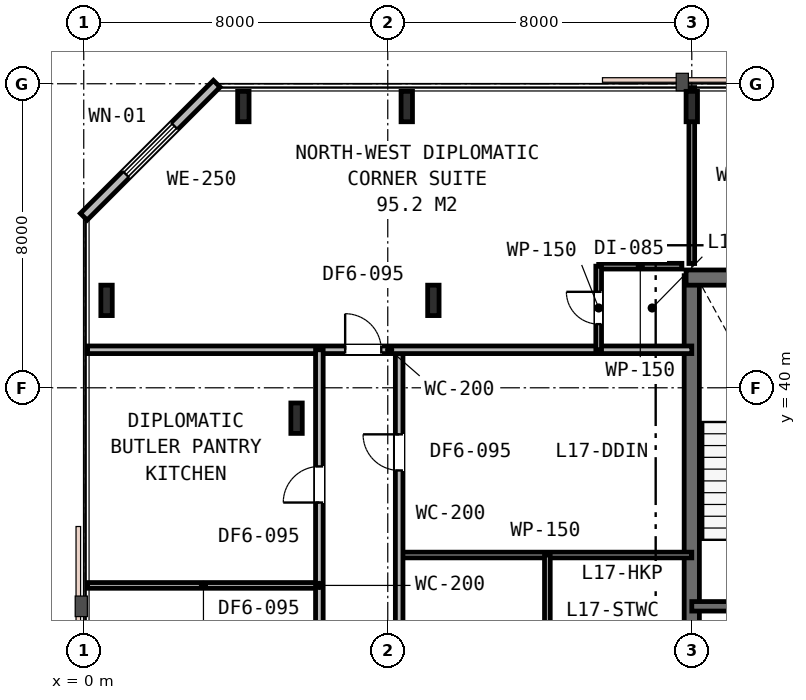
"""IFC4 building model, lengths in metres.
Left out: names, types, materials, properties, quantities, classifications, styles, units other than length and angle.
Written with IfcOpenShell. Run it as: python <this file> out.ifc"""

import sys

from ifc_helpers import new_model, si_unit, direction, frame, frame_2d, origin, origin_2d, place, context, subcontext, project, spatial, rectangle, i_section, extrude, element, fill, save


model = new_model("IFC4")
c1 = context("Model", 3, precision=1e-05, world=origin(), true_north=direction((0.0, 1.0)))
c2 = subcontext(c1, "Body", "Model", "MODEL_VIEW")
j1 = project(units=[si_unit("LENGTHUNIT", "METRE"), si_unit("PLANEANGLEUNIT", "RADIAN")], contexts=[c1])
p1 = place(None, origin())
s1 = spatial("IfcSite", under=j1, at=p1, CompositionType="ELEMENT")
p2 = place(p1, origin())
s2 = spatial("IfcBuilding", under=s1, at=p2, CompositionType="ELEMENT")
p3 = place(p2, frame((0.0, 0.0, 69.0)))
s3 = spatial("IfcBuildingStorey", under=s2, at=p3, CompositionType="ELEMENT", Elevation=69.0)
p4 = place(p3, frame((16.0, 30.65, 0.0), z_axis=(0.0, 0.0, 1.0), x_axis=(0.0, 1.0, 0.0)))
e1 = element("IfcWall", 1, at=p4, inside=s3, PredefinedType="SHEAR", context=c2, shape_type="SweptSolid", body=[
    extrude(rectangle(XDim=12.3, YDim=0.4, at=frame_2d((6.15, 0.0))), origin(), (0.0, 0.0, 1.0), 3.6),
])
p5 = place(p3, frame((15.85, 42.9, 0.0), z_axis=(0.0, 0.0, 1.0), x_axis=(1.0, 0.0, 0.0)))
e2 = element("IfcWall", 2, at=p5, inside=s3, PredefinedType="SHEAR", context=c2, shape_type="SweptSolid", body=[
    extrude(rectangle(XDim=24.3, YDim=0.4, at=frame_2d((12.15, 0.0))), origin(), (0.0, 0.0, 1.0), 3.6),
])
p6 = place(p3, frame((16.0, 34.25, 0.0), z_axis=(0.0, 0.0, 1.0), x_axis=(1.0, 0.0, 0.0)))
e3 = element("IfcWall", 3, at=p6, inside=s3, PredefinedType="SHEAR", context=c2, shape_type="SweptSolid", body=[
    extrude(rectangle(XDim=6.05, YDim=0.25, at=frame_2d((3.025, 0.0))), origin(), (0.0, 0.0, 1.0), 3.6),
])
p7 = place(p6, frame((1.25, 0.0, 0.0)))
e4 = element("IfcOpeningElement", 4, at=p7, cuts=e3, PredefinedType="OPENING", context=c2, shape_type="SweptSolid", body=[
    extrude(rectangle(XDim=1.0, YDim=2.15, at=frame_2d((0.5, 1.075))), frame((0.0, 0.135, 0.0), z_axis=(0.0, -1.0, 0.0), x_axis=(1.0, 0.0, 0.0)), (0.0, 0.0, 1.0), 0.27),
])
p8 = place(p6, frame((4.2, 0.0, 0.0)))
e5 = element("IfcOpeningElement", 5, at=p8, cuts=e3, PredefinedType="OPENING", context=c2, shape_type="SweptSolid", body=[
    extrude(rectangle(XDim=1.1, YDim=2.15, at=frame_2d((0.55, 1.075))), frame((0.0, 0.135, 0.0), z_axis=(0.0, -1.0, 0.0), x_axis=(1.0, 0.0, 0.0)), (0.0, 0.0, 1.0), 0.27),
])
for number, where, z_axis, x_axis in (
    (6, (5.6, 39.2, 0.0), (0.0, 0.0, 1.0), (1.0, 0.0, 0.0)),
    (7, (9.2, 42.3, 0.0), (0.0, 0.0, 1.0), (1.0, 0.0, 0.0)),
    (8, (0.6, 42.3, 0.0), (0.0, 0.0, 1.0), (1.0, 0.0, 0.0)),
    (9, (4.2, 47.4, 0.0), (0.0, 0.0, 1.0), (1.0, 0.0, 0.0)),
    (10, (8.5, 47.4, 0.0), (0.0, 0.0, 1.0), (1.0, 0.0, 0.0)),
    (11, (16.0, 47.4, 0.0), (0.0, 0.0, 1.0), (1.0, 0.0, 0.0)),
):
    element("IfcColumn", number, at=place(p3, frame(where, z_axis=z_axis, x_axis=x_axis)), inside=s3, PredefinedType="COLUMN", context=c2, shape_type="SweptSolid", body=[
        extrude(i_section(OverallWidth=0.3, OverallDepth=0.8, WebThickness=0.018, FlangeThickness=0.033, FilletRadius=0.03, at=origin_2d()), origin(), (0.0, 0.0, 1.0), 3.6),
    ])
p9 = place(p3, frame((3.5, 48.0, 0.0), z_axis=(0.0, 0.0, 1.0), x_axis=(-0.707106781187, -0.707106781187, 0.0)))
e12 = element("IfcWall", 12, at=p9, inside=s3, PredefinedType="STANDARD", context=c2, shape_type="SweptSolid", body=[
    extrude(rectangle(XDim=4.95, YDim=0.25, at=frame_2d((2.475, 0.0))), origin(), (0.0, 0.0, 1.0), 3.33),
])
p10 = place(p9, frame((1.575, 0.0, 0.75)))
e13 = element("IfcOpeningElement", 13, at=p10, cuts=e12, PredefinedType="OPENING", context=c2, shape_type="SweptSolid", body=[
    extrude(rectangle(XDim=1.8, YDim=1.85, at=frame_2d((0.9, 0.925))), frame((0.0, 0.135, 0.0), z_axis=(0.0, -1.0, 0.0), x_axis=(1.0, 0.0, 0.0)), (0.0, 0.0, 1.0), 0.27),
])
p11 = place(p3, frame((8.3, 35.6, 0.0), z_axis=(0.0, 0.0, 1.0), x_axis=(1.0, 0.0, 0.0)))
e14 = element("IfcWall", 14, at=p11, inside=s3, PredefinedType="PARTITIONING", context=c2, shape_type="SweptSolid", body=[
    extrude(rectangle(XDim=7.7, YDim=0.15, at=frame_2d((3.85, 0.0))), origin(), (0.0, 0.0, 1.0), 2.83),
])
p12 = place(p3, frame((12.2, 30.8, 0.0), z_axis=(0.0, 0.0, 1.0), x_axis=(0.0, 1.0, 0.0)))
e15 = element("IfcWall", 15, at=p12, inside=s3, PredefinedType="PARTITIONING", context=c2, shape_type="SweptSolid", body=[
    extrude(rectangle(XDim=4.8, YDim=0.15, at=frame_2d((2.4, 0.0))), origin(), (0.0, 0.0, 1.0), 2.83),
])
p13 = place(p3, frame((8.3, 30.8, 0.0), z_axis=(0.0, 0.0, 1.0), x_axis=(0.0, 1.0, 0.0)))
e16 = element("IfcWall", 16, at=p13, inside=s3, PredefinedType="PARTITIONING", context=c2, shape_type="SweptSolid", body=[
    extrude(rectangle(XDim=10.2, YDim=0.2, at=frame_2d((5.1, 0.0))), origin(), (0.0, 0.0, 1.0), 2.83),
])
p14 = place(p13, frame((1.95, 0.0, 0.0)))
e17 = element("IfcOpeningElement", 17, at=p14, cuts=e16, PredefinedType="OPENING", context=c2, shape_type="SweptSolid", body=[
    extrude(rectangle(XDim=0.9, YDim=2.15, at=frame_2d((0.45, 1.075))), frame((0.0, 0.11, 0.0), z_axis=(0.0, -1.0, 0.0), x_axis=(1.0, 0.0, 0.0)), (0.0, 0.0, 1.0), 0.22),
])
p15 = place(p13, frame((7.025, 0.0, 0.0)))
e18 = element("IfcOpeningElement", 18, at=p15, cuts=e16, PredefinedType="OPENING", context=c2, shape_type="SweptSolid", body=[
    extrude(rectangle(XDim=0.95, YDim=2.15, at=frame_2d((0.475, 1.075))), frame((0.0, 0.11, 0.0), z_axis=(0.0, -1.0, 0.0), x_axis=(1.0, 0.0, 0.0)), (0.0, 0.0, 1.0), 0.22),
])
p16 = place(p3, frame((0.1, 41.0, 0.0), z_axis=(0.0, 0.0, 1.0), x_axis=(1.0, 0.0, 0.0)))
e19 = element("IfcWall", 19, at=p16, inside=s3, PredefinedType="PARTITIONING", context=c2, shape_type="SweptSolid", body=[
    extrude(rectangle(XDim=15.9, YDim=0.2, at=frame_2d((7.95, 0.0))), origin(), (0.0, 0.0, 1.0), 2.83),
])
p17 = place(p16, frame((6.779, 0.0, 0.0)))
e20 = element("IfcOpeningElement", 20, at=p17, cuts=e19, PredefinedType="OPENING", context=c2, shape_type="SweptSolid", body=[
    extrude(rectangle(XDim=0.95, YDim=2.15, at=frame_2d((0.475, 1.075))), frame((0.0, 0.11, 0.0), z_axis=(0.0, -1.0, 0.0), x_axis=(1.0, 0.0, 0.0)), (0.0, 0.0, 1.0), 0.22),
])
p18 = place(p3, frame((13.55, 43.2, 0.0), z_axis=(0.0, 0.0, 1.0), x_axis=(1.0, 0.0, 0.0)))
e21 = element("IfcWall", 21, at=p18, inside=s3, PredefinedType="PARTITIONING", context=c2, shape_type="SweptSolid", body=[
    extrude(rectangle(XDim=2.19, YDim=0.15, at=frame_2d((1.095, 0.0))), origin(), (0.0, 0.0, 1.0), 3.33),
])
p19 = place(p3, frame((13.55, 41.0, 0.0), z_axis=(0.0, 0.0, 1.0), x_axis=(0.0, 1.0, 0.0)))
e22 = element("IfcWall", 22, at=p19, inside=s3, PredefinedType="PARTITIONING", context=c2, shape_type="SweptSolid", body=[
    extrude(rectangle(XDim=2.2, YDim=0.15, at=frame_2d((1.1, 0.0))), origin(), (0.0, 0.0, 1.0), 3.33),
])
p20 = place(p19, frame((0.675, 0.0, 0.0)))
e23 = element("IfcOpeningElement", 23, at=p20, cuts=e22, PredefinedType="OPENING", context=c2, shape_type="SweptSolid", body=[
    extrude(rectangle(XDim=0.85, YDim=2.15, at=frame_2d((0.425, 1.075))), frame((0.0, 0.085, 0.0), z_axis=(0.0, -1.0, 0.0), x_axis=(1.0, 0.0, 0.0)), (0.0, 0.0, 1.0), 0.17),
])
p21 = place(p3, frame((0.1, 34.8, 0.0), z_axis=(0.0, 0.0, 1.0), x_axis=(1.0, 0.0, 0.0)))
e24 = element("IfcWall", 24, at=p21, inside=s3, PredefinedType="PARTITIONING", context=c2, shape_type="SweptSolid", body=[
    extrude(rectangle(XDim=6.1, YDim=0.15, at=frame_2d((3.05, 0.0))), origin(), (0.0, 0.0, 1.0), 2.83),
])
p22 = place(p3, frame((6.2, 28.6, 0.0), z_axis=(0.0, 0.0, 1.0), x_axis=(0.0, 1.0, 0.0)))
e25 = element("IfcWall", 25, at=p22, inside=s3, PredefinedType="PARTITIONING", context=c2, shape_type="SweptSolid", body=[
    extrude(rectangle(XDim=12.4, YDim=0.2, at=frame_2d((6.2, 0.0))), origin(), (0.0, 0.0, 1.0), 2.83),
])
p23 = place(p22, frame((3.725, 0.0, 0.0)))
e26 = element("IfcOpeningElement", 26, at=p23, cuts=e25, PredefinedType="OPENING", context=c2, shape_type="SweptSolid", body=[
    extrude(rectangle(XDim=0.95, YDim=2.15, at=frame_2d((0.475, 1.075))), frame((0.0, 0.11, 0.0), z_axis=(0.0, -1.0, 0.0), x_axis=(1.0, 0.0, 0.0)), (0.0, 0.0, 1.0), 0.22),
])
p24 = place(p22, frame((8.381, 0.0, 0.0)))
e27 = element("IfcOpeningElement", 27, at=p24, cuts=e25, PredefinedType="OPENING", context=c2, shape_type="SweptSolid", body=[
    extrude(rectangle(XDim=0.95, YDim=2.15, at=frame_2d((0.475, 1.075))), frame((0.0, 0.11, 0.0), z_axis=(0.0, -1.0, 0.0), x_axis=(1.0, 0.0, 0.0)), (0.0, 0.0, 1.0), 0.22),
])
p25 = place(p3, frame((16.0, 43.27, 0.0), z_axis=(0.0, 0.0, 1.0), x_axis=(0.0, 1.0, 0.0)))
e28 = element("IfcWall", 28, at=p25, inside=s3, PredefinedType="PARTITIONING", context=c2, shape_type="SweptSolid", body=[
    extrude(rectangle(XDim=4.63, YDim=0.15, at=frame_2d((2.315, 0.0))), origin(), (0.0, 0.0, 1.0), 2.92),
])
p26 = place(p10, origin())
e29 = element("IfcWindow", 29, at=p26, inside=s3, PartitioningType="SINGLE_PANEL", PredefinedType="WINDOW", context=c2, shape_type="SweptSolid", body=[
    extrude(rectangle(XDim=1.8, YDim=1.85, at=frame_2d((0.9, 0.925))), frame((0.0, 0.03, 0.0), z_axis=(0.0, -1.0, 0.0), x_axis=(1.0, 0.0, 0.0)), (0.0, 0.0, 1.0), 0.06),
])
fill(e13, e29)
p27 = place(p17, origin())
e30 = element("IfcDoor", 30, at=p27, inside=s3, OperationType="SINGLE_SWING_LEFT", PredefinedType="DOOR", context=c2, shape_type="SweptSolid", body=[
    extrude(rectangle(XDim=0.95, YDim=2.15, at=frame_2d((0.475, 1.075))), frame((0.0, 0.025, 0.0), z_axis=(0.0, -1.0, 0.0), x_axis=(1.0, 0.0, 0.0)), (0.0, 0.0, 1.0), 0.05),
])
fill(e20, e30)
p28 = place(p20, origin())
e31 = element("IfcDoor", 31, at=p28, inside=s3, OperationType="SINGLE_SWING_RIGHT", PredefinedType="DOOR", context=c2, shape_type="SweptSolid", body=[
    extrude(rectangle(XDim=0.85, YDim=2.15, at=frame_2d((0.425, 1.075))), frame((0.0, 0.025, 0.0), z_axis=(0.0, -1.0, 0.0), x_axis=(1.0, 0.0, 0.0)), (0.0, 0.0, 1.0), 0.05),
])
fill(e23, e31)
p29 = place(p24, origin())
e32 = element("IfcDoor", 32, at=p29, inside=s3, OperationType="SINGLE_SWING_LEFT", PredefinedType="DOOR", context=c2, shape_type="SweptSolid", body=[
    extrude(rectangle(XDim=0.95, YDim=2.15, at=frame_2d((0.475, 1.075))), frame((0.0, 0.025, 0.0), z_axis=(0.0, -1.0, 0.0), x_axis=(1.0, 0.0, 0.0)), (0.0, 0.0, 1.0), 0.05),
])
fill(e27, e32)
p30 = place(p15, origin())
e33 = element("IfcDoor", 33, at=p30, inside=s3, OperationType="SINGLE_SWING_RIGHT", PredefinedType="DOOR", context=c2, shape_type="SweptSolid", body=[
    extrude(rectangle(XDim=0.95, YDim=2.15, at=frame_2d((0.475, 1.075))), frame((0.0, 0.025, 0.0), z_axis=(0.0, -1.0, 0.0), x_axis=(1.0, 0.0, 0.0)), (0.0, 0.0, 1.0), 0.05),
])
fill(e18, e33)
save(model, sys.argv[1])
